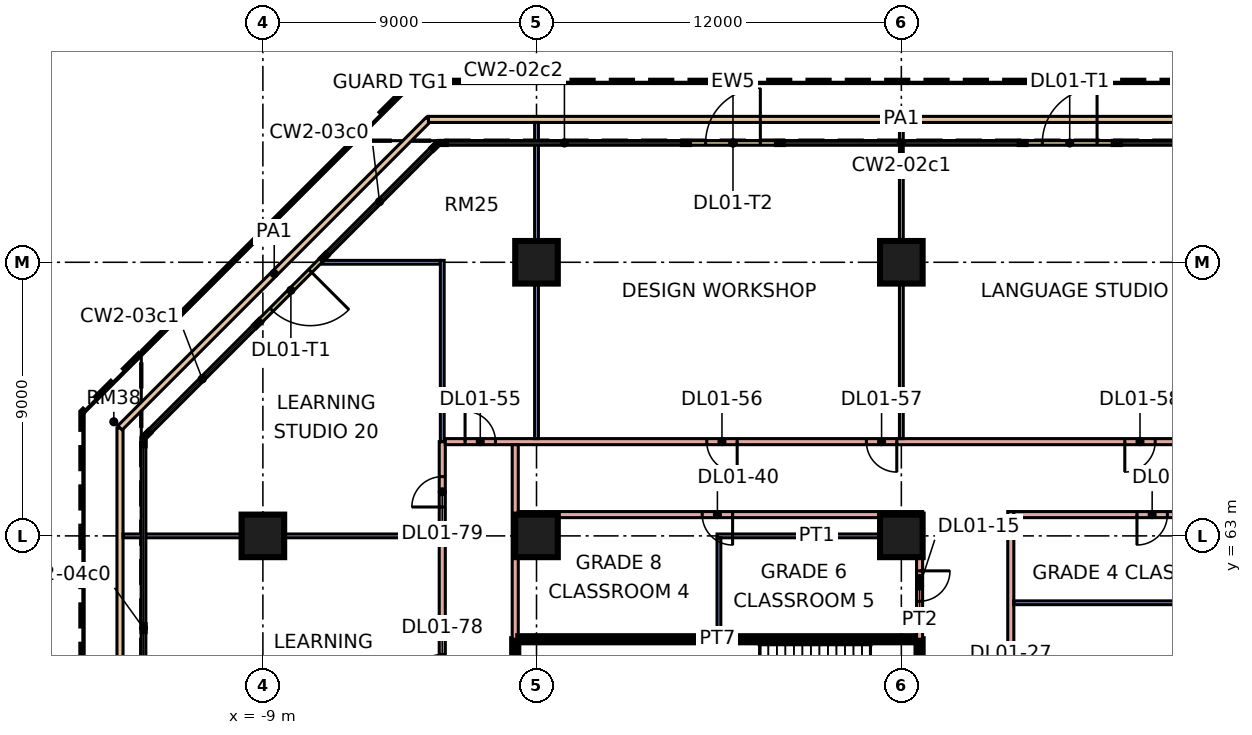
"""IFC4 building model, lengths in metres.
Left out: names, types, materials, properties, quantities, classifications, styles, units other than length and angle.
Written with IfcOpenShell. Run it as: python <this file> out.ifc"""

import sys

from ifc_helpers import new_model, si_unit, direction, frame, frame_2d, origin, origin_2d, place, context, subcontext, project, spatial, rectangle, extrude, element, fill, save


model = new_model("IFC4")
c1 = context("Model", 3, precision=1e-05, world=origin(), true_north=direction((0.0, 1.0)))
c2 = subcontext(c1, "Body", "Model", "MODEL_VIEW")
j1 = project(units=[si_unit("LENGTHUNIT", "METRE"), si_unit("PLANEANGLEUNIT", "RADIAN")], contexts=[c1])
p1 = place(None, origin())
s1 = spatial("IfcSite", under=j1, at=p1, CompositionType="ELEMENT")
p2 = place(p1, origin())
s2 = spatial("IfcBuilding", under=s1, at=p2, CompositionType="ELEMENT")
p3 = place(p2, frame((0.0, 0.0, 7.2)))
s3 = spatial("IfcBuildingStorey", under=s2, at=p3, CompositionType="ELEMENT", Elevation=7.2)
for number, where, z_axis, x_axis in (
    (1, (-9.0, 63.0, 0.0), (0.0, 0.0, 1.0), (1.0, 0.0, 0.0)),
    (2, (0.0, 63.0, 0.0), (0.0, 0.0, 1.0), (1.0, 0.0, 0.0)),
    (3, (12.0, 63.0, 0.0), (0.0, 0.0, 1.0), (1.0, 0.0, 0.0)),
    (4, (0.0, 72.0, 0.0), (0.0, 0.0, 1.0), (1.0, 0.0, 0.0)),
    (5, (12.0, 72.0, 0.0), (0.0, 0.0, 1.0), (1.0, 0.0, 0.0)),
):
    element("IfcColumn", number, at=place(p3, frame(where, z_axis=z_axis, x_axis=x_axis)), inside=s3, PredefinedType="COLUMN", context=c2, shape_type="SweptSolid", body=[
        extrude(rectangle(XDim=1.4, YDim=1.4, at=origin_2d()), origin(), (0.0, 0.0, 1.0), 4.8),
    ])
p4 = place(p3, frame((19.038, 75.925, 0.0), z_axis=(0.0, 0.0, 1.0), x_axis=(-1.0, 0.0, 0.0)))
e6 = element("IfcWall", 6, at=p4, inside=s3, PredefinedType="SOLIDWALL", context=c2, shape_type="SweptSolid", body=[
    extrude(rectangle(XDim=3.0, YDim=0.15, at=frame_2d((1.5, 0.0))), origin(), (0.0, 0.0, 1.0), 4.4),
])
p5 = place(p4, frame((0.6, 0.0, 0.0)))
e7 = element("IfcOpeningElement", 7, at=p5, cuts=e6, PredefinedType="OPENING", context=c2, shape_type="SweptSolid", body=[
    extrude(rectangle(XDim=1.8, YDim=2.4, at=frame_2d((0.9, 1.2))), frame((0.0, 0.085, 0.0), z_axis=(0.0, -1.0, 0.0), x_axis=(1.0, 0.0, 0.0)), (0.0, 0.0, 1.0), 0.17),
])
p6 = place(p3, frame((7.962, 75.925, 0.0), z_axis=(0.0, 0.0, 1.0), x_axis=(-1.0, 0.0, 0.0)))
e8 = element("IfcWall", 8, at=p6, inside=s3, PredefinedType="SOLIDWALL", context=c2, shape_type="SweptSolid", body=[
    extrude(rectangle(XDim=3.0, YDim=0.15, at=frame_2d((1.5, 0.0))), origin(), (0.0, 0.0, 1.0), 4.4),
])
p7 = place(p6, frame((0.6, 0.0, 0.0)))
e9 = element("IfcOpeningElement", 9, at=p7, cuts=e8, PredefinedType="OPENING", context=c2, shape_type="SweptSolid", body=[
    extrude(rectangle(XDim=1.8, YDim=2.4, at=frame_2d((0.9, 1.2))), frame((0.0, 0.085, 0.0), z_axis=(0.0, -1.0, 0.0), x_axis=(1.0, 0.0, 0.0)), (0.0, 0.0, 1.0), 0.17),
])
p8 = place(p3, frame((-7.018, 72.139, 0.0), z_axis=(0.0, 0.0, 1.0), x_axis=(-0.707106781187, -0.707106781187, 0.0)))
e10 = element("IfcWall", 10, at=p8, inside=s3, PredefinedType="SOLIDWALL", context=c2, shape_type="SweptSolid", body=[
    extrude(rectangle(XDim=3.0, YDim=0.15, at=frame_2d((1.5, 0.0))), origin(), (0.0, 0.0, 1.0), 4.4),
])
p9 = place(p8, frame((0.6, 0.0, 0.0)))
e11 = element("IfcOpeningElement", 11, at=p9, cuts=e10, PredefinedType="OPENING", context=c2, shape_type="SweptSolid", body=[
    extrude(rectangle(XDim=1.8, YDim=2.4, at=frame_2d((0.9, 1.2))), frame((0.0, 0.085, 0.0), z_axis=(0.0, -1.0, 0.0), x_axis=(1.0, 0.0, 0.0)), (0.0, 0.0, 1.0), 0.17),
])
p10 = place(p3, frame((-13.7, 7.447, 0.0), z_axis=(0.0, 0.0, 1.0), x_axis=(0.0, 1.0, 0.0)))
e12 = element("IfcWall", 12, at=p10, inside=s3, PredefinedType="PARAPET", context=c2, shape_type="SweptSolid", body=[
    extrude(rectangle(XDim=59.107, YDim=0.2, at=frame_2d((29.553, 0.0))), origin(), (0.0, 0.0, 1.0), 0.5),
])
p11 = place(p3, frame((-13.7, 66.553, 0.0), z_axis=(0.0, 0.0, 1.0), x_axis=(0.707106781187, 0.707106781187, 0.0)))
e13 = element("IfcWall", 13, at=p11, inside=s3, PredefinedType="PARAPET", context=c2, shape_type="SweptSolid", body=[
    extrude(rectangle(XDim=14.349, YDim=0.2, at=frame_2d((7.175, 0.0))), origin(), (0.0, 0.0, 1.0), 0.5),
])
p12 = place(p3, frame((-3.553, 76.7, 0.0), z_axis=(0.0, 0.0, 1.0), x_axis=(1.0, 0.0, 0.0)))
e14 = element("IfcWall", 14, at=p12, inside=s3, PredefinedType="PARAPET", context=c2, shape_type="SweptSolid", body=[
    extrude(rectangle(XDim=31.107, YDim=0.2, at=frame_2d((15.553, 0.0))), origin(), (0.0, 0.0, 1.0), 0.5),
])
p13 = place(p3, frame((-13.6, 63.0, 0.0), z_axis=(0.0, 0.0, 1.0), x_axis=(1.0, 0.0, 0.0)))
e15 = element("IfcWall", 15, at=p13, inside=s3, PredefinedType="PARTITIONING", context=c2, shape_type="SweptSolid", body=[
    extrude(rectangle(XDim=10.4, YDim=0.125, at=frame_2d((5.2, 0.0))), origin(), (0.0, 0.0, 1.0), 4.4),
])
p14 = place(p3, frame((-7.053, 72.0, 0.0), z_axis=(0.0, 0.0, 1.0), x_axis=(1.0, 0.0, 0.0)))
e16 = element("IfcWall", 16, at=p14, inside=s3, PredefinedType="PARTITIONING", context=c2, shape_type="SweptSolid", body=[
    extrude(rectangle(XDim=3.891, YDim=0.125, at=frame_2d((1.945, 0.0))), origin(), (0.0, 0.0, 1.0), 4.4),
])
p15 = place(p3, frame((-3.1, -1.953, 0.0), z_axis=(0.0, 0.0, 1.0), x_axis=(0.0, 1.0, 0.0)))
e17 = element("IfcWall", 17, at=p15, inside=s3, PredefinedType="PARTITIONING", context=c2, shape_type="SweptSolid", body=[
    extrude(rectangle(XDim=68.053, YDim=0.2, at=frame_2d((34.026, 0.0))), origin(), (0.0, 0.0, 1.0), 4.4),
])
p16 = place(p15, frame((7.553, 0.0, 0.0)))
e18 = element("IfcOpeningElement", 18, at=p16, cuts=e17, PredefinedType="OPENING", context=c2, shape_type="SweptSolid", body=[
    extrude(rectangle(XDim=1.0, YDim=2.1, at=frame_2d((0.5, 1.05))), frame((0.0, 0.11, 0.0), z_axis=(0.0, -1.0, 0.0), x_axis=(1.0, 0.0, 0.0)), (0.0, 0.0, 1.0), 0.22),
])
p17 = place(p15, frame((19.553, 0.0, 0.0)))
e19 = element("IfcOpeningElement", 19, at=p17, cuts=e17, PredefinedType="OPENING", context=c2, shape_type="SweptSolid", body=[
    extrude(rectangle(XDim=1.0, YDim=2.1, at=frame_2d((0.5, 1.05))), frame((0.0, 0.11, 0.0), z_axis=(0.0, -1.0, 0.0), x_axis=(1.0, 0.0, 0.0)), (0.0, 0.0, 1.0), 0.22),
])
p18 = place(p15, frame((24.803, 0.0, 0.0)))
e20 = element("IfcOpeningElement", 20, at=p18, cuts=e17, PredefinedType="OPENING", context=c2, shape_type="SweptSolid", body=[
    extrude(rectangle(XDim=1.0, YDim=2.1, at=frame_2d((0.5, 1.05))), frame((0.0, 0.11, 0.0), z_axis=(0.0, -1.0, 0.0), x_axis=(1.0, 0.0, 0.0)), (0.0, 0.0, 1.0), 0.22),
])
p19 = place(p15, frame((31.553, 0.0, 0.0)))
e21 = element("IfcOpeningElement", 21, at=p19, cuts=e17, PredefinedType="OPENING", context=c2, shape_type="SweptSolid", body=[
    extrude(rectangle(XDim=1.0, YDim=2.1, at=frame_2d((0.5, 1.05))), frame((0.0, 0.11, 0.0), z_axis=(0.0, -1.0, 0.0), x_axis=(1.0, 0.0, 0.0)), (0.0, 0.0, 1.0), 0.22),
])
p20 = place(p15, frame((36.803, 0.0, 0.0)))
e22 = element("IfcOpeningElement", 22, at=p20, cuts=e17, PredefinedType="OPENING", context=c2, shape_type="SweptSolid", body=[
    extrude(rectangle(XDim=1.0, YDim=2.1, at=frame_2d((0.5, 1.05))), frame((0.0, 0.11, 0.0), z_axis=(0.0, -1.0, 0.0), x_axis=(1.0, 0.0, 0.0)), (0.0, 0.0, 1.0), 0.22),
])
p21 = place(p15, frame((42.053, 0.0, 0.0)))
e23 = element("IfcOpeningElement", 23, at=p21, cuts=e17, PredefinedType="OPENING", context=c2, shape_type="SweptSolid", body=[
    extrude(rectangle(XDim=1.0, YDim=2.1, at=frame_2d((0.5, 1.05))), frame((0.0, 0.11, 0.0), z_axis=(0.0, -1.0, 0.0), x_axis=(1.0, 0.0, 0.0)), (0.0, 0.0, 1.0), 0.22),
])
p22 = place(p15, frame((51.053, 0.0, 0.0)))
e24 = element("IfcOpeningElement", 24, at=p22, cuts=e17, PredefinedType="OPENING", context=c2, shape_type="SweptSolid", body=[
    extrude(rectangle(XDim=1.0, YDim=2.1, at=frame_2d((0.5, 1.05))), frame((0.0, 0.11, 0.0), z_axis=(0.0, -1.0, 0.0), x_axis=(1.0, 0.0, 0.0)), (0.0, 0.0, 1.0), 0.22),
])
p23 = place(p15, frame((60.053, 0.0, 0.0)))
e25 = element("IfcOpeningElement", 25, at=p23, cuts=e17, PredefinedType="OPENING", context=c2, shape_type="SweptSolid", body=[
    extrude(rectangle(XDim=1.0, YDim=2.1, at=frame_2d((0.5, 1.05))), frame((0.0, 0.11, 0.0), z_axis=(0.0, -1.0, 0.0), x_axis=(1.0, 0.0, 0.0)), (0.0, 0.0, 1.0), 0.22),
])
p24 = place(p15, frame((65.903, 0.0, 0.0)))
e26 = element("IfcOpeningElement", 26, at=p24, cuts=e17, PredefinedType="OPENING", context=c2, shape_type="SweptSolid", body=[
    extrude(rectangle(XDim=1.0, YDim=2.1, at=frame_2d((0.5, 1.05))), frame((0.0, 0.11, 0.0), z_axis=(0.0, -1.0, 0.0), x_axis=(1.0, 0.0, 0.0)), (0.0, 0.0, 1.0), 0.22),
])
p25 = place(p3, frame((-3.1, 66.1, 0.0), z_axis=(0.0, 0.0, 1.0), x_axis=(0.0, 1.0, 0.0)))
e27 = element("IfcWall", 27, at=p25, inside=s3, PredefinedType="PARTITIONING", context=c2, shape_type="SweptSolid", body=[
    extrude(rectangle(XDim=5.962, YDim=0.125, at=frame_2d((2.981, 0.0))), origin(), (0.0, 0.0, 1.0), 4.4),
])
p26 = place(p3, frame((-3.0, 66.1, 0.0), z_axis=(0.0, 0.0, 1.0), x_axis=(1.0, 0.0, 0.0)))
e28 = element("IfcWall", 28, at=p26, inside=s3, PredefinedType="PARTITIONING", context=c2, shape_type="SweptSolid", body=[
    extrude(rectangle(XDim=30.0, YDim=0.2, at=frame_2d((15.0, 0.0))), origin(), (0.0, 0.0, 1.0), 4.4),
])
p27 = place(p26, frame((0.65, 0.0, 0.0)))
e29 = element("IfcOpeningElement", 29, at=p27, cuts=e28, PredefinedType="OPENING", context=c2, shape_type="SweptSolid", body=[
    extrude(rectangle(XDim=1.0, YDim=2.1, at=frame_2d((0.5, 1.05))), frame((0.0, 0.11, 0.0), z_axis=(0.0, -1.0, 0.0), x_axis=(1.0, 0.0, 0.0)), (0.0, 0.0, 1.0), 0.22),
])
p28 = place(p26, frame((8.6, 0.0, 0.0)))
e30 = element("IfcOpeningElement", 30, at=p28, cuts=e28, PredefinedType="OPENING", context=c2, shape_type="SweptSolid", body=[
    extrude(rectangle(XDim=1.0, YDim=2.1, at=frame_2d((0.5, 1.05))), frame((0.0, 0.11, 0.0), z_axis=(0.0, -1.0, 0.0), x_axis=(1.0, 0.0, 0.0)), (0.0, 0.0, 1.0), 0.22),
])
p29 = place(p26, frame((13.85, 0.0, 0.0)))
e31 = element("IfcOpeningElement", 31, at=p29, cuts=e28, PredefinedType="OPENING", context=c2, shape_type="SweptSolid", body=[
    extrude(rectangle(XDim=1.0, YDim=2.1, at=frame_2d((0.5, 1.05))), frame((0.0, 0.11, 0.0), z_axis=(0.0, -1.0, 0.0), x_axis=(1.0, 0.0, 0.0)), (0.0, 0.0, 1.0), 0.22),
])
p30 = place(p26, frame((22.35, 0.0, 0.0)))
e32 = element("IfcOpeningElement", 32, at=p30, cuts=e28, PredefinedType="OPENING", context=c2, shape_type="SweptSolid", body=[
    extrude(rectangle(XDim=1.0, YDim=2.1, at=frame_2d((0.5, 1.05))), frame((0.0, 0.11, 0.0), z_axis=(0.0, -1.0, 0.0), x_axis=(1.0, 0.0, 0.0)), (0.0, 0.0, 1.0), 0.22),
])
p31 = place(p26, frame((25.85, 0.0, 0.0)))
e33 = element("IfcOpeningElement", 33, at=p31, cuts=e28, PredefinedType="OPENING", context=c2, shape_type="SweptSolid", body=[
    extrude(rectangle(XDim=1.0, YDim=2.1, at=frame_2d((0.5, 1.05))), frame((0.0, 0.11, 0.0), z_axis=(0.0, -1.0, 0.0), x_axis=(1.0, 0.0, 0.0)), (0.0, 0.0, 1.0), 0.22),
])
p32 = place(p26, frame((28.45, 0.0, 0.0)))
e34 = element("IfcOpeningElement", 34, at=p32, cuts=e28, PredefinedType="OPENING", context=c2, shape_type="SweptSolid", body=[
    extrude(rectangle(XDim=1.0, YDim=2.1, at=frame_2d((0.5, 1.05))), frame((0.0, 0.11, 0.0), z_axis=(0.0, -1.0, 0.0), x_axis=(1.0, 0.0, 0.0)), (0.0, 0.0, 1.0), 0.22),
])
p33 = place(p3, frame((-0.7, 54.0, 0.0), z_axis=(0.0, 0.0, 1.0), x_axis=(0.0, 1.0, 0.0)))
e35 = element("IfcWall", 35, at=p33, inside=s3, PredefinedType="SOLIDWALL", context=c2, shape_type="SweptSolid", body=[
    extrude(rectangle(XDim=5.6, YDim=0.2, at=frame_2d((2.8, 0.0))), origin(), (0.0, 0.0, 1.0), 4.4),
])
p34 = place(p3, frame((-0.7, 59.6, 0.0), z_axis=(0.0, 0.0, 1.0), x_axis=(0.0, 1.0, 0.0)))
e36 = element("IfcWall", 36, at=p34, inside=s3, PredefinedType="PARTITIONING", context=c2, shape_type="SweptSolid", body=[
    extrude(rectangle(XDim=6.4, YDim=0.2, at=frame_2d((3.2, 0.0))), origin(), (0.0, 0.0, 1.0), 4.4),
])
p35 = place(p3, frame((-0.6, 59.6, 0.0), z_axis=(0.0, 0.0, 1.0), x_axis=(1.0, 0.0, 0.0)))
e37 = element("IfcWall", 37, at=p35, inside=s3, PredefinedType="SOLIDWALL", context=c2, shape_type="SweptSolid", body=[
    extrude(rectangle(XDim=13.1, YDim=0.2, at=frame_2d((6.55, 0.0))), origin(), (0.0, 0.0, 1.0), 4.4),
])
p36 = place(p3, frame((-0.6, 63.7, 0.0), z_axis=(0.0, 0.0, 1.0), x_axis=(1.0, 0.0, 0.0)))
e38 = element("IfcWall", 38, at=p36, inside=s3, PredefinedType="PARTITIONING", context=c2, shape_type="SweptSolid", body=[
    extrude(rectangle(XDim=13.3, YDim=0.2, at=frame_2d((6.65, 0.0))), origin(), (0.0, 0.0, 1.0), 4.4),
])
p37 = place(p36, frame((6.05, 0.0, 0.0)))
e39 = element("IfcOpeningElement", 39, at=p37, cuts=e38, PredefinedType="OPENING", context=c2, shape_type="SweptSolid", body=[
    extrude(rectangle(XDim=1.0, YDim=2.1, at=frame_2d((0.5, 1.05))), frame((0.0, 0.11, 0.0), z_axis=(0.0, -1.0, 0.0), x_axis=(1.0, 0.0, 0.0)), (0.0, 0.0, 1.0), 0.22),
])
p38 = place(p3, frame((0.0, 66.2, 0.0), z_axis=(0.0, 0.0, 1.0), x_axis=(0.0, 1.0, 0.0)))
e40 = element("IfcWall", 40, at=p38, inside=s3, PredefinedType="PARTITIONING", context=c2, shape_type="SweptSolid", body=[
    extrude(rectangle(XDim=10.4, YDim=0.125, at=frame_2d((5.2, 0.0))), origin(), (0.0, 0.0, 1.0), 4.4),
])
p39 = place(p3, frame((5.938, 63.0, 0.0), z_axis=(0.0, 0.0, 1.0), x_axis=(1.0, 0.0, 0.0)))
e41 = element("IfcWall", 41, at=p39, inside=s3, PredefinedType="PARTITIONING", context=c2, shape_type="SweptSolid", body=[
    extrude(rectangle(XDim=6.562, YDim=0.125, at=frame_2d((3.281, 0.0))), origin(), (0.0, 0.0, 1.0), 4.4),
])
p40 = place(p3, frame((6.0, 59.7, 0.0), z_axis=(0.0, 0.0, 1.0), x_axis=(0.0, 1.0, 0.0)))
e42 = element("IfcWall", 42, at=p40, inside=s3, PredefinedType="PARTITIONING", context=c2, shape_type="SweptSolid", body=[
    extrude(rectangle(XDim=3.238, YDim=0.125, at=frame_2d((1.619, 0.0))), origin(), (0.0, 0.0, 1.0), 4.4),
])
p41 = place(p3, frame((12.0, 66.2, 0.0), z_axis=(0.0, 0.0, 1.0), x_axis=(0.0, 1.0, 0.0)))
e43 = element("IfcWall", 43, at=p41, inside=s3, PredefinedType="PARTITIONING", context=c2, shape_type="SweptSolid", body=[
    extrude(rectangle(XDim=10.4, YDim=0.125, at=frame_2d((5.2, 0.0))), origin(), (0.0, 0.0, 1.0), 4.4),
])
p42 = place(p3, frame((12.6, 54.0, 0.0), z_axis=(0.0, 0.0, 1.0), x_axis=(0.0, 1.0, 0.0)))
e44 = element("IfcWall", 44, at=p42, inside=s3, PredefinedType="SOLIDWALL", context=c2, shape_type="SweptSolid", body=[
    extrude(rectangle(XDim=5.6, YDim=0.2, at=frame_2d((2.8, 0.0))), origin(), (0.0, 0.0, 1.0), 4.4),
])
p43 = place(p42, frame((3.25, 0.0, 0.0)))
e45 = element("IfcOpeningElement", 45, at=p43, cuts=e44, PredefinedType="OPENING", context=c2, shape_type="SweptSolid", body=[
    extrude(rectangle(XDim=1.2, YDim=2.1, at=frame_2d((0.6, 1.05))), frame((0.0, 0.11, 0.0), z_axis=(0.0, -1.0, 0.0), x_axis=(1.0, 0.0, 0.0)), (0.0, 0.0, 1.0), 0.22),
])
p44 = place(p3, frame((12.6, 59.6, 0.0), z_axis=(0.0, 0.0, 1.0), x_axis=(0.0, 1.0, 0.0)))
e46 = element("IfcWall", 46, at=p44, inside=s3, PredefinedType="PARTITIONING", context=c2, shape_type="SweptSolid", body=[
    extrude(rectangle(XDim=4.0, YDim=0.2, at=frame_2d((2.0, 0.0))), origin(), (0.0, 0.0, 1.0), 4.4),
])
p45 = place(p44, frame((1.25, 0.0, 0.0)))
e47 = element("IfcOpeningElement", 47, at=p45, cuts=e46, PredefinedType="OPENING", context=c2, shape_type="SweptSolid", body=[
    extrude(rectangle(XDim=1.0, YDim=2.1, at=frame_2d((0.5, 1.05))), frame((0.0, 0.11, 0.0), z_axis=(0.0, -1.0, 0.0), x_axis=(1.0, 0.0, 0.0)), (0.0, 0.0, 1.0), 0.22),
])
p46 = place(p3, frame((15.6, 51.225, 0.0), z_axis=(0.0, 0.0, 1.0), x_axis=(0.0, 1.0, 0.0)))
e48 = element("IfcWall", 48, at=p46, inside=s3, PredefinedType="PARTITIONING", context=c2, shape_type="SweptSolid", body=[
    extrude(rectangle(XDim=12.575, YDim=0.2, at=frame_2d((6.288, 0.0))), origin(), (0.0, 0.0, 1.0), 4.4),
])
p47 = place(p46, frame((6.025, 0.0, 0.0)))
e49 = element("IfcOpeningElement", 49, at=p47, cuts=e48, PredefinedType="OPENING", context=c2, shape_type="SweptSolid", body=[
    extrude(rectangle(XDim=1.0, YDim=2.1, at=frame_2d((0.5, 1.05))), frame((0.0, 0.11, 0.0), z_axis=(0.0, -1.0, 0.0), x_axis=(1.0, 0.0, 0.0)), (0.0, 0.0, 1.0), 0.22),
])
p48 = place(p3, frame((15.7, 60.8, 0.0), z_axis=(0.0, 0.0, 1.0), x_axis=(1.0, 0.0, 0.0)))
e50 = element("IfcWall", 50, at=p48, inside=s3, PredefinedType="PARTITIONING", context=c2, shape_type="SweptSolid", body=[
    extrude(rectangle(XDim=8.9, YDim=0.125, at=frame_2d((4.45, 0.0))), origin(), (0.0, 0.0, 1.0), 4.4),
])
p49 = place(p3, frame((15.7, 63.7, 0.0), z_axis=(0.0, 0.0, 1.0), x_axis=(1.0, 0.0, 0.0)))
e51 = element("IfcWall", 51, at=p49, inside=s3, PredefinedType="PARTITIONING", context=c2, shape_type="SweptSolid", body=[
    extrude(rectangle(XDim=8.9, YDim=0.2, at=frame_2d((4.45, 0.0))), origin(), (0.0, 0.0, 1.0), 4.4),
])
p50 = place(p49, frame((4.05, 0.0, 0.0)))
e52 = element("IfcOpeningElement", 52, at=p50, cuts=e51, PredefinedType="OPENING", context=c2, shape_type="SweptSolid", body=[
    extrude(rectangle(XDim=1.0, YDim=2.1, at=frame_2d((0.5, 1.05))), frame((0.0, 0.11, 0.0), z_axis=(0.0, -1.0, 0.0), x_axis=(1.0, 0.0, 0.0)), (0.0, 0.0, 1.0), 0.22),
])
p51 = place(p5, frame((1.8, 0.0, 0.0), z_axis=(0.0, 0.0, 1.0), x_axis=(-1.0, 0.0, 0.0)))
e53 = element("IfcDoor", 53, at=p51, inside=s3, OperationType="DOUBLE_DOOR_SINGLE_SWING", PredefinedType="DOOR", context=c2, shape_type="SweptSolid", body=[
    extrude(rectangle(XDim=1.8, YDim=2.4, at=frame_2d((0.9, 1.2))), frame((0.0, 0.025, 0.0), z_axis=(0.0, -1.0, 0.0), x_axis=(1.0, 0.0, 0.0)), (0.0, 0.0, 1.0), 0.05),
])
fill(e7, e53)
p52 = place(p7, frame((1.8, 0.0, 0.0), z_axis=(0.0, 0.0, 1.0), x_axis=(-1.0, 0.0, 0.0)))
e54 = element("IfcDoor", 54, at=p52, inside=s3, OperationType="DOUBLE_DOOR_SINGLE_SWING", PredefinedType="DOOR", context=c2, shape_type="SweptSolid", body=[
    extrude(rectangle(XDim=1.8, YDim=2.4, at=frame_2d((0.9, 1.2))), frame((0.0, 0.025, 0.0), z_axis=(0.0, -1.0, 0.0), x_axis=(1.0, 0.0, 0.0)), (0.0, 0.0, 1.0), 0.05),
])
fill(e9, e54)
p53 = place(p9, origin())
e55 = element("IfcDoor", 55, at=p53, inside=s3, OperationType="DOUBLE_DOOR_SINGLE_SWING", PredefinedType="DOOR", context=c2, shape_type="SweptSolid", body=[
    extrude(rectangle(XDim=1.8, YDim=2.4, at=frame_2d((0.9, 1.2))), frame((0.0, 0.025, 0.0), z_axis=(0.0, -1.0, 0.0), x_axis=(1.0, 0.0, 0.0)), (0.0, 0.0, 1.0), 0.05),
])
fill(e11, e55)
p54 = place(p45, origin())
e56 = element("IfcDoor", 56, at=p54, inside=s3, OperationType="SINGLE_SWING_RIGHT", PredefinedType="DOOR", context=c2, shape_type="SweptSolid", body=[
    extrude(rectangle(XDim=1.0, YDim=2.1, at=frame_2d((0.5, 1.05))), frame((0.0, 0.025, 0.0), z_axis=(0.0, -1.0, 0.0), x_axis=(1.0, 0.0, 0.0)), (0.0, 0.0, 1.0), 0.05),
])
fill(e47, e56)
p55 = place(p50, frame((1.0, 0.0, 0.0), z_axis=(0.0, 0.0, 1.0), x_axis=(-1.0, 0.0, 0.0)))
e57 = element("IfcDoor", 57, at=p55, inside=s3, OperationType="SINGLE_SWING_LEFT", PredefinedType="DOOR", context=c2, shape_type="SweptSolid", body=[
    extrude(rectangle(XDim=1.0, YDim=2.1, at=frame_2d((0.5, 1.05))), frame((0.0, 0.025, 0.0), z_axis=(0.0, -1.0, 0.0), x_axis=(1.0, 0.0, 0.0)), (0.0, 0.0, 1.0), 0.05),
])
fill(e52, e57)
p56 = place(p37, origin())
e58 = element("IfcDoor", 58, at=p56, inside=s3, OperationType="SINGLE_SWING_RIGHT", PredefinedType="DOOR", context=c2, shape_type="SweptSolid", body=[
    extrude(rectangle(XDim=1.0, YDim=2.1, at=frame_2d((0.5, 1.05))), frame((0.0, 0.025, 0.0), z_axis=(0.0, -1.0, 0.0), x_axis=(1.0, 0.0, 0.0)), (0.0, 0.0, 1.0), 0.05),
])
fill(e39, e58)
p57 = place(p27, origin())
e59 = element("IfcDoor", 59, at=p57, inside=s3, OperationType="SINGLE_SWING_LEFT", PredefinedType="DOOR", context=c2, shape_type="SweptSolid", body=[
    extrude(rectangle(XDim=1.0, YDim=2.1, at=frame_2d((0.5, 1.05))), frame((0.0, 0.025, 0.0), z_axis=(0.0, -1.0, 0.0), x_axis=(1.0, 0.0, 0.0)), (0.0, 0.0, 1.0), 0.05),
])
fill(e29, e59)
p58 = place(p28, origin())
e60 = element("IfcDoor", 60, at=p58, inside=s3, OperationType="SINGLE_SWING_RIGHT", PredefinedType="DOOR", context=c2, shape_type="SweptSolid", body=[
    extrude(rectangle(XDim=1.0, YDim=2.1, at=frame_2d((0.5, 1.05))), frame((0.0, 0.025, 0.0), z_axis=(0.0, -1.0, 0.0), x_axis=(1.0, 0.0, 0.0)), (0.0, 0.0, 1.0), 0.05),
])
fill(e30, e60)
p59 = place(p29, origin())
e61 = element("IfcDoor", 61, at=p59, inside=s3, OperationType="SINGLE_SWING_RIGHT", PredefinedType="DOOR", context=c2, shape_type="SweptSolid", body=[
    extrude(rectangle(XDim=1.0, YDim=2.1, at=frame_2d((0.5, 1.05))), frame((0.0, 0.025, 0.0), z_axis=(0.0, -1.0, 0.0), x_axis=(1.0, 0.0, 0.0)), (0.0, 0.0, 1.0), 0.05),
])
fill(e31, e61)
p60 = place(p30, frame((1.0, 0.0, 0.0), z_axis=(0.0, 0.0, 1.0), x_axis=(-1.0, 0.0, 0.0)))
e62 = element("IfcDoor", 62, at=p60, inside=s3, OperationType="SINGLE_SWING_LEFT", PredefinedType="DOOR", context=c2, shape_type="SweptSolid", body=[
    extrude(rectangle(XDim=1.0, YDim=2.1, at=frame_2d((0.5, 1.05))), frame((0.0, 0.025, 0.0), z_axis=(0.0, -1.0, 0.0), x_axis=(1.0, 0.0, 0.0)), (0.0, 0.0, 1.0), 0.05),
])
fill(e32, e62)
p61 = place(p23, origin())
e63 = element("IfcDoor", 63, at=p61, inside=s3, OperationType="SINGLE_SWING_LEFT", PredefinedType="DOOR", context=c2, shape_type="SweptSolid", body=[
    extrude(rectangle(XDim=1.0, YDim=2.1, at=frame_2d((0.5, 1.05))), frame((0.0, 0.025, 0.0), z_axis=(0.0, -1.0, 0.0), x_axis=(1.0, 0.0, 0.0)), (0.0, 0.0, 1.0), 0.05),
])
fill(e25, e63)
p62 = place(p24, origin())
e64 = element("IfcDoor", 64, at=p62, inside=s3, OperationType="SINGLE_SWING_LEFT", PredefinedType="DOOR", context=c2, shape_type="SweptSolid", body=[
    extrude(rectangle(XDim=1.0, YDim=2.1, at=frame_2d((0.5, 1.05))), frame((0.0, 0.025, 0.0), z_axis=(0.0, -1.0, 0.0), x_axis=(1.0, 0.0, 0.0)), (0.0, 0.0, 1.0), 0.05),
])
fill(e26, e64)
save(model, sys.argv[1])
